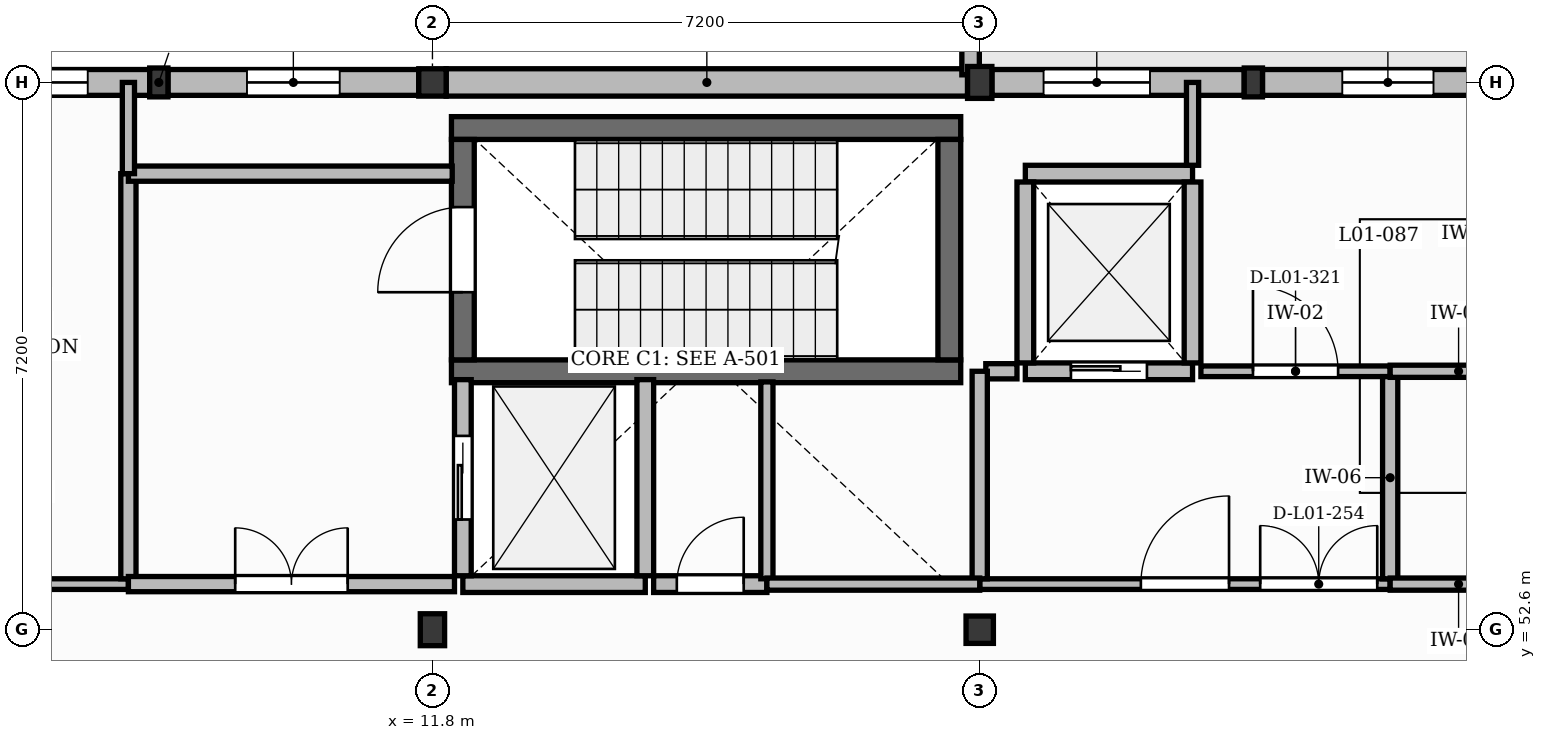
"""IFC4 building model, lengths in metres.
Left out: names, types, materials, properties, quantities, classifications, styles, units other than length and angle.
Written with IfcOpenShell. Run it as: python <this file> out.ifc"""

import sys

from ifc_helpers import new_model, si_unit, direction, frame, frame_2d, origin, origin_2d, place, context, subcontext, project, spatial, rectangle, extrude, element, fill, save


model = new_model("IFC4")
c1 = context("Model", 3, precision=1e-05, world=origin(), true_north=direction((0.0, 1.0)))
c2 = subcontext(c1, "Body", "Model", "MODEL_VIEW")
j1 = project(units=[si_unit("LENGTHUNIT", "METRE"), si_unit("PLANEANGLEUNIT", "RADIAN")], contexts=[c1])
p1 = place(None, origin())
s1 = spatial("IfcSite", under=j1, at=p1, CompositionType="ELEMENT")
p2 = place(p1, origin())
s2 = spatial("IfcBuilding", under=s1, at=p2, CompositionType="ELEMENT")
p3 = place(p2, frame((0.0, 0.0, 4.5)))
s3 = spatial("IfcBuildingStorey", under=s2, at=p3, CompositionType="ELEMENT", Elevation=4.5)
p4 = place(p3, frame((11.8, 52.6, 0.0), z_axis=(0.0, 0.0, 1.0), x_axis=(1.0, 0.0, 0.0)))
e1 = element("IfcColumn", 1, at=p4, inside=s3, PredefinedType="COLUMN", context=c2, shape_type="SweptSolid", body=[
    extrude(rectangle(XDim=0.32, YDim=0.42, at=origin_2d()), origin(), (0.0, 0.0, 1.0), 4.26),
])
for number, where, z_axis, x_axis in (
    (2, (11.8, 59.8, 0.0), (0.0, 0.0, 1.0), (1.0, 0.0, 0.0)),
    (3, (19.0, 52.6, 0.0), (0.0, 0.0, 1.0), (1.0, 0.0, 0.0)),
):
    element("IfcColumn", number, at=place(p3, frame(where, z_axis=z_axis, x_axis=x_axis)), inside=s3, PredefinedType="COLUMN", context=c2, shape_type="SweptSolid", body=[
        extrude(rectangle(XDim=0.36, YDim=0.36, at=origin_2d()), origin(), (0.0, 0.0, 1.0), 4.26),
    ])
p5 = place(p3, frame((19.0, 59.8, 0.0), z_axis=(0.0, 0.0, 1.0), x_axis=(1.0, 0.0, 0.0)))
e4 = element("IfcColumn", 4, at=p5, inside=s3, PredefinedType="COLUMN", context=c2, shape_type="SweptSolid", body=[
    extrude(rectangle(XDim=0.32, YDim=0.42, at=origin_2d()), origin(), (0.0, 0.0, 1.0), 4.26),
])
for number, where, z_axis, x_axis in (
    (5, (8.2, 59.8, 0.0), (0.0, 0.0, 1.0), (1.0, 0.0, 0.0)),
    (6, (22.6, 59.8, 0.0), (0.0, 0.0, 1.0), (1.0, 0.0, 0.0)),
):
    element("IfcColumn", number, at=place(p3, frame(where, z_axis=z_axis, x_axis=x_axis)), inside=s3, PredefinedType="PILASTER", context=c2, shape_type="SweptSolid", body=[
        extrude(rectangle(XDim=0.24, YDim=0.38, at=origin_2d()), origin(), (0.0, 0.0, 1.0), 4.26),
    ])
p6 = place(p3, frame((4.76, 59.8, 0.0), z_axis=(0.0, 0.0, 1.0), x_axis=(1.0, 0.0, 0.0)))
e7 = element("IfcWall", 7, at=p6, inside=s3, PredefinedType="SOLIDWALL", context=c2, shape_type="SweptSolid", body=[
    extrude(rectangle(XDim=3.32, YDim=0.34, at=frame_2d((1.66, 0.0))), origin(), (0.0, 0.0, 1.0), 3.8),
])
p7 = place(p6, frame((0.655, 0.0, 1.0)))
e8 = element("IfcOpeningElement", 8, at=p7, cuts=e7, PredefinedType="OPENING", context=c2, shape_type="SweptSolid", body=[
    extrude(rectangle(XDim=1.85, YDim=2.2, at=frame_2d((0.925, 1.1))), frame((0.0, 0.18, 0.0), z_axis=(0.0, -1.0, 0.0), x_axis=(1.0, 0.0, 0.0)), (0.0, 0.0, 1.0), 0.36),
])
p8 = place(p3, frame((8.32, 59.8, 0.0), z_axis=(0.0, 0.0, 1.0), x_axis=(1.0, 0.0, 0.0)))
e9 = element("IfcWall", 9, at=p8, inside=s3, PredefinedType="SOLIDWALL", context=c2, shape_type="SweptSolid", body=[
    extrude(rectangle(XDim=3.3, YDim=0.34, at=frame_2d((1.65, 0.0))), origin(), (0.0, 0.0, 1.0), 3.8),
])
p9 = place(p8, frame((1.04, 0.0, 1.0)))
e10 = element("IfcOpeningElement", 10, at=p9, cuts=e9, PredefinedType="OPENING", context=c2, shape_type="SweptSolid", body=[
    extrude(rectangle(XDim=1.22, YDim=2.2, at=frame_2d((0.61, 1.1))), frame((0.0, 0.18, 0.0), z_axis=(0.0, -1.0, 0.0), x_axis=(1.0, 0.0, 0.0)), (0.0, 0.0, 1.0), 0.36),
])
p10 = place(p3, frame((11.98, 59.8, 0.0), z_axis=(0.0, 0.0, 1.0), x_axis=(1.0, 0.0, 0.0)))
e11 = element("IfcWall", 11, at=p10, inside=s3, PredefinedType="SOLIDWALL", context=c2, shape_type="SweptSolid", body=[
    extrude(rectangle(XDim=6.86, YDim=0.36, at=frame_2d((3.43, 0.0))), origin(), (0.0, 0.0, 1.0), 3.8),
])
p11 = place(p3, frame((19.16, 59.8, 0.0), z_axis=(0.0, 0.0, 1.0), x_axis=(1.0, 0.0, 0.0)))
e12 = element("IfcWall", 12, at=p11, inside=s3, PredefinedType="SOLIDWALL", context=c2, shape_type="SweptSolid", body=[
    extrude(rectangle(XDim=3.32, YDim=0.34, at=frame_2d((1.66, 0.0))), origin(), (0.0, 0.0, 1.0), 3.8),
])
p12 = place(p11, frame((0.68, 0.0, 1.05)))
e13 = element("IfcOpeningElement", 13, at=p12, cuts=e12, PredefinedType="OPENING", context=c2, shape_type="SweptSolid", body=[
    extrude(rectangle(XDim=1.4, YDim=1.65, at=frame_2d((0.7, 0.825))), frame((0.0, 0.18, 0.0), z_axis=(0.0, -1.0, 0.0), x_axis=(1.0, 0.0, 0.0)), (0.0, 0.0, 1.0), 0.36),
])
p13 = place(p3, frame((22.72, 59.8, 0.0), z_axis=(0.0, 0.0, 1.0), x_axis=(1.0, 0.0, 0.0)))
e14 = element("IfcWall", 14, at=p13, inside=s3, PredefinedType="SOLIDWALL", context=c2, shape_type="SweptSolid", body=[
    extrude(rectangle(XDim=3.3, YDim=0.34, at=frame_2d((1.65, 0.0))), origin(), (0.0, 0.0, 1.0), 3.8),
])
p14 = place(p13, frame((1.05, 0.0, 1.0)))
e15 = element("IfcOpeningElement", 15, at=p14, cuts=e14, PredefinedType="OPENING", context=c2, shape_type="SweptSolid", body=[
    extrude(rectangle(XDim=1.2, YDim=1.95, at=frame_2d((0.6, 0.975))), frame((0.0, 0.18, 0.0), z_axis=(0.0, -1.0, 0.0), x_axis=(1.0, 0.0, 0.0)), (0.0, 0.0, 1.0), 0.36),
])
p15 = place(p3, frame((18.88, 59.9, -0.05), z_axis=(0.0, 0.0, 1.0), x_axis=(0.0, 1.0, 0.0)))
e16 = element("IfcWall", 16, at=p15, inside=s3, PredefinedType="PARAPET", context=c2, shape_type="SweptSolid", body=[
    extrude(rectangle(XDim=1.68, YDim=0.23, at=frame_2d((0.84, 0.0))), origin(), (0.0, 0.0, 1.0), 0.8),
])
for number, where, z_axis, x_axis in (
    (17, (12.05, 56.0, 0.0), (0.0, 0.0, 1.0), (1.0, 0.0, 0.0)),
    (18, (12.05, 59.2, 0.0), (0.0, 0.0, 1.0), (1.0, 0.0, 0.0)),
):
    element("IfcWall", number, at=place(p3, frame(where, z_axis=z_axis, x_axis=x_axis)), inside=s3, PredefinedType="SHEAR", context=c2, shape_type="SweptSolid", body=[
        extrude(rectangle(XDim=6.7, YDim=0.3, at=frame_2d((3.35, 0.0))), origin(), (0.0, 0.0, 1.0), 4.25),
    ])
p16 = place(p3, frame((12.2, 56.15, 0.0), z_axis=(0.0, 0.0, 1.0), x_axis=(0.0, 1.0, 0.0)))
e19 = element("IfcWall", 19, at=p16, inside=s3, PredefinedType="SHEAR", context=c2, shape_type="SweptSolid", body=[
    extrude(rectangle(XDim=2.9, YDim=0.3, at=frame_2d((1.45, 0.0))), origin(), (0.0, 0.0, 1.0), 4.25),
])
p17 = place(p16, frame((0.89, 0.0, 0.0)))
e20 = element("IfcOpeningElement", 20, at=p17, cuts=e19, PredefinedType="OPENING", context=c2, shape_type="SweptSolid", body=[
    extrude(rectangle(XDim=1.12, YDim=2.1, at=frame_2d((0.56, 1.05))), frame((0.0, 0.16, 0.0), z_axis=(0.0, -1.0, 0.0), x_axis=(1.0, 0.0, 0.0)), (0.0, 0.0, 1.0), 0.32),
])
p18 = place(p3, frame((18.6, 56.15, 0.0), z_axis=(0.0, 0.0, 1.0), x_axis=(0.0, 1.0, 0.0)))
e21 = element("IfcWall", 21, at=p18, inside=s3, PredefinedType="SHEAR", context=c2, shape_type="SweptSolid", body=[
    extrude(rectangle(XDim=2.9, YDim=0.3, at=frame_2d((1.45, 0.0))), origin(), (0.0, 0.0, 1.0), 4.25),
])
p19 = place(p3, frame((12.2, 53.2, 0.0), z_axis=(0.0, 0.0, 1.0), x_axis=(1.0, 0.0, 0.0)))
e22 = element("IfcWall", 22, at=p19, inside=s3, PredefinedType="SOLIDWALL", context=c2, shape_type="SweptSolid", body=[
    extrude(rectangle(XDim=2.4, YDim=0.22, at=frame_2d((1.2, 0.0))), origin(), (0.0, 0.0, 1.0), 4.25),
])
p20 = place(p3, frame((12.2, 53.31, 0.0), z_axis=(0.0, 0.0, 1.0), x_axis=(0.0, 1.0, 0.0)))
e23 = element("IfcWall", 23, at=p20, inside=s3, PredefinedType="SOLIDWALL", context=c2, shape_type="SweptSolid", body=[
    extrude(rectangle(XDim=2.58, YDim=0.22, at=frame_2d((1.29, 0.0))), origin(), (0.0, 0.0, 1.0), 4.25),
])
p21 = place(p20, frame((0.74, 0.0, 0.0)))
e24 = element("IfcOpeningElement", 24, at=p21, cuts=e23, PredefinedType="OPENING", context=c2, shape_type="SweptSolid", body=[
    extrude(rectangle(XDim=1.1, YDim=2.15, at=frame_2d((0.55, 1.075))), frame((0.0, 0.12, 0.0), z_axis=(0.0, -1.0, 0.0), x_axis=(1.0, 0.0, 0.0)), (0.0, 0.0, 1.0), 0.24),
])
p22 = place(p3, frame((14.6, 53.31, 0.0), z_axis=(0.0, 0.0, 1.0), x_axis=(0.0, 1.0, 0.0)))
e25 = element("IfcWall", 25, at=p22, inside=s3, PredefinedType="SOLIDWALL", context=c2, shape_type="SweptSolid", body=[
    extrude(rectangle(XDim=2.58, YDim=0.22, at=frame_2d((1.29, 0.0))), origin(), (0.0, 0.0, 1.0), 4.25),
])
p23 = place(p3, frame((19.6, 56.0, 0.0), z_axis=(0.0, 0.0, 1.0), x_axis=(1.0, 0.0, 0.0)))
e26 = element("IfcWall", 26, at=p23, inside=s3, PredefinedType="SOLIDWALL", context=c2, shape_type="SweptSolid", body=[
    extrude(rectangle(XDim=2.2, YDim=0.22, at=frame_2d((1.1, 0.0))), origin(), (0.0, 0.0, 1.0), 4.25),
])
p24 = place(p23, frame((0.6, 0.0, 0.0)))
e27 = element("IfcOpeningElement", 27, at=p24, cuts=e26, PredefinedType="OPENING", context=c2, shape_type="SweptSolid", body=[
    extrude(rectangle(XDim=1.0, YDim=2.15, at=frame_2d((0.5, 1.075))), frame((0.0, 0.12, 0.0), z_axis=(0.0, -1.0, 0.0), x_axis=(1.0, 0.0, 0.0)), (0.0, 0.0, 1.0), 0.24),
])
p25 = place(p3, frame((19.6, 58.6, 0.0), z_axis=(0.0, 0.0, 1.0), x_axis=(1.0, 0.0, 0.0)))
e28 = element("IfcWall", 28, at=p25, inside=s3, PredefinedType="SOLIDWALL", context=c2, shape_type="SweptSolid", body=[
    extrude(rectangle(XDim=2.2, YDim=0.22, at=frame_2d((1.1, 0.0))), origin(), (0.0, 0.0, 1.0), 4.25),
])
for number, where, z_axis, x_axis in (
    (29, (19.6, 56.11, 0.0), (0.0, 0.0, 1.0), (0.0, 1.0, 0.0)),
    (30, (21.8, 56.11, 0.0), (0.0, 0.0, 1.0), (0.0, 1.0, 0.0)),
):
    element("IfcWall", number, at=place(p3, frame(where, z_axis=z_axis, x_axis=x_axis)), inside=s3, PredefinedType="SOLIDWALL", context=c2, shape_type="SweptSolid", body=[
        extrude(rectangle(XDim=2.38, YDim=0.22, at=frame_2d((1.19, 0.0))), origin(), (0.0, 0.0, 1.0), 4.25),
    ])
p26 = place(p3, frame((4.6, 53.2, 0.0), z_axis=(0.0, 0.0, 1.0), x_axis=(1.0, 0.0, 0.0)))
e31 = element("IfcWall", 31, at=p26, inside=s3, PredefinedType="PARTITIONING", context=c2, shape_type="SweptSolid", body=[
    extrude(rectangle(XDim=3.2, YDim=0.14, at=frame_2d((1.6, 0.0))), origin(), (0.0, 0.0, 1.0), 4.18),
])
p27 = place(p26, frame((1.08, 0.0, 0.0)))
e32 = element("IfcOpeningElement", 32, at=p27, cuts=e31, PredefinedType="OPENING", context=c2, shape_type="SweptSolid", body=[
    extrude(rectangle(XDim=1.04, YDim=2.1, at=frame_2d((0.52, 1.05))), frame((0.0, 0.08, 0.0), z_axis=(0.0, -1.0, 0.0), x_axis=(1.0, 0.0, 0.0)), (0.0, 0.0, 1.0), 0.16),
])
p28 = place(p3, frame((7.8, 53.27, 0.0), z_axis=(0.0, 0.0, 1.0), x_axis=(0.0, 1.0, 0.0)))
e33 = element("IfcWall", 33, at=p28, inside=s3, PredefinedType="PARTITIONING", context=c2, shape_type="SweptSolid", body=[
    extrude(rectangle(XDim=5.33, YDim=0.2, at=frame_2d((2.665, 0.0))), origin(), (0.0, 0.0, 1.0), 4.18),
])
p29 = place(p3, frame((7.8, 53.2, 0.0), z_axis=(0.0, 0.0, 1.0), x_axis=(1.0, 0.0, 0.0)))
e34 = element("IfcWall", 34, at=p29, inside=s3, PredefinedType="PARTITIONING", context=c2, shape_type="SweptSolid", body=[
    extrude(rectangle(XDim=4.29, YDim=0.2, at=frame_2d((2.145, 0.0))), origin(), (0.0, 0.0, 1.0), 4.18),
])
p30 = place(p29, frame((1.405, 0.0, 0.0)))
e35 = element("IfcOpeningElement", 35, at=p30, cuts=e34, PredefinedType="OPENING", context=c2, shape_type="SweptSolid", body=[
    extrude(rectangle(XDim=1.48, YDim=2.25, at=frame_2d((0.74, 1.125))), frame((0.0, 0.11, 0.0), z_axis=(0.0, -1.0, 0.0), x_axis=(1.0, 0.0, 0.0)), (0.0, 0.0, 1.0), 0.22),
])
p31 = place(p3, frame((14.71, 53.2, 0.0), z_axis=(0.0, 0.0, 1.0), x_axis=(1.0, 0.0, 0.0)))
e36 = element("IfcWall", 36, at=p31, inside=s3, PredefinedType="SOLIDWALL", context=c2, shape_type="SweptSolid", body=[
    extrude(rectangle(XDim=1.49, YDim=0.22, at=frame_2d((0.745, 0.0))), origin(), (0.0, 0.0, 1.0), 4.18),
])
p32 = place(p31, frame((0.305, 0.0, 0.0)))
e37 = element("IfcOpeningElement", 37, at=p32, cuts=e36, PredefinedType="OPENING", context=c2, shape_type="SweptSolid", body=[
    extrude(rectangle(XDim=0.88, YDim=2.05, at=frame_2d((0.44, 1.025))), frame((0.0, 0.12, 0.0), z_axis=(0.0, -1.0, 0.0), x_axis=(1.0, 0.0, 0.0)), (0.0, 0.0, 1.0), 0.24),
])
p33 = place(p3, frame((19.0, 53.2, 0.0), z_axis=(0.0, 0.0, 1.0), x_axis=(1.0, 0.0, 0.0)))
e38 = element("IfcWall", 38, at=p33, inside=s3, PredefinedType="PARTITIONING", context=c2, shape_type="SweptSolid", body=[
    extrude(rectangle(XDim=5.4, YDim=0.14, at=frame_2d((2.7, 0.0))), origin(), (0.0, 0.0, 1.0), 4.18),
])
p34 = place(p33, frame((2.12, 0.0, 0.0)))
e39 = element("IfcOpeningElement", 39, at=p34, cuts=e38, PredefinedType="OPENING", context=c2, shape_type="SweptSolid", body=[
    extrude(rectangle(XDim=1.16, YDim=2.1, at=frame_2d((0.58, 1.05))), frame((0.0, 0.08, 0.0), z_axis=(0.0, -1.0, 0.0), x_axis=(1.0, 0.0, 0.0)), (0.0, 0.0, 1.0), 0.16),
])
p35 = place(p33, frame((3.69, 0.0, 0.0)))
e40 = element("IfcOpeningElement", 40, at=p35, cuts=e38, PredefinedType="OPENING", context=c2, shape_type="SweptSolid", body=[
    extrude(rectangle(XDim=1.54, YDim=2.25, at=frame_2d((0.77, 1.125))), frame((0.0, 0.08, 0.0), z_axis=(0.0, -1.0, 0.0), x_axis=(1.0, 0.0, 0.0)), (0.0, 0.0, 1.0), 0.16),
])
p36 = place(p3, frame((21.91, 56.0, 0.0), z_axis=(0.0, 0.0, 1.0), x_axis=(1.0, 0.0, 0.0)))
e41 = element("IfcWall", 41, at=p36, inside=s3, PredefinedType="PARTITIONING", context=c2, shape_type="SweptSolid", body=[
    extrude(rectangle(XDim=2.49, YDim=0.14, at=frame_2d((1.245, 0.0))), origin(), (0.0, 0.0, 1.0), 4.18),
])
p37 = place(p36, frame((0.685, 0.0, 0.0)))
e42 = element("IfcOpeningElement", 42, at=p37, cuts=e41, PredefinedType="OPENING", context=c2, shape_type="SweptSolid", body=[
    extrude(rectangle(XDim=1.12, YDim=2.15, at=frame_2d((0.56, 1.075))), frame((0.0, 0.08, 0.0), z_axis=(0.0, -1.0, 0.0), x_axis=(1.0, 0.0, 0.0)), (0.0, 0.0, 1.0), 0.16),
])
p38 = place(p3, frame((16.2, 53.27, 0.0), z_axis=(0.0, 0.0, 1.0), x_axis=(0.0, 1.0, 0.0)))
e43 = element("IfcWall", 43, at=p38, inside=s3, PredefinedType="PARTITIONING", context=c2, shape_type="SweptSolid", body=[
    extrude(rectangle(XDim=2.59, YDim=0.16, at=frame_2d((1.295, 0.0))), origin(), (0.0, 0.0, 1.0), 4.18),
])
p39 = place(p3, frame((12.06, 58.6, 0.0), z_axis=(0.0, 0.0, 1.0), x_axis=(-1.0, 0.0, 0.0)))
e44 = element("IfcWall", 44, at=p39, inside=s3, PredefinedType="PARTITIONING", context=c2, shape_type="SweptSolid", body=[
    extrude(rectangle(XDim=4.26, YDim=0.2, at=frame_2d((2.13, 0.0))), origin(), (0.0, 0.0, 1.0), 4.18),
])
p40 = place(p3, frame((24.4, 53.27, 0.0), z_axis=(0.0, 0.0, 1.0), x_axis=(0.0, 1.0, 0.0)))
e45 = element("IfcWall", 45, at=p40, inside=s3, PredefinedType="PARTITIONING", context=c2, shape_type="SweptSolid", body=[
    extrude(rectangle(XDim=2.66, YDim=0.2, at=frame_2d((1.33, 0.0))), origin(), (0.0, 0.0, 1.0), 4.18),
])
p41 = place(p3, frame((19.49, 56.0, 0.0), z_axis=(0.0, 0.0, 1.0), x_axis=(-1.0, 0.0, 0.0)))
e46 = element("IfcWall", 46, at=p41, inside=s3, PredefinedType="PARTITIONING", context=c2, shape_type="SweptSolid", body=[
    extrude(rectangle(XDim=0.41, YDim=0.2, at=frame_2d((0.205, 0.0))), origin(), (0.0, 0.0, 1.0), 4.18),
])
p42 = place(p3, frame((19.0, 53.27, 0.0), z_axis=(0.0, 0.0, 1.0), x_axis=(0.0, 1.0, 0.0)))
e47 = element("IfcWall", 47, at=p42, inside=s3, PredefinedType="PARTITIONING", context=c2, shape_type="SweptSolid", body=[
    extrude(rectangle(XDim=2.73, YDim=0.2, at=frame_2d((1.365, 0.0))), origin(), (0.0, 0.0, 1.0), 3.74),
])
p43 = place(p3, frame((26.2, 53.2, 0.0), z_axis=(0.0, 0.0, 1.0), x_axis=(-1.0, 0.0, 0.0)))
e48 = element("IfcWall", 48, at=p43, inside=s3, PredefinedType="PARTITIONING", context=c2, shape_type="SweptSolid", body=[
    extrude(rectangle(XDim=1.8, YDim=0.16, at=frame_2d((0.9, 0.0))), origin(), (0.0, 0.0, 1.0), 4.18),
])
p44 = place(p3, frame((19.0, 53.2, 0.0), z_axis=(0.0, 0.0, 1.0), x_axis=(-1.0, 0.0, 0.0)))
e49 = element("IfcWall", 49, at=p44, inside=s3, PredefinedType="PARTITIONING", context=c2, shape_type="SweptSolid", body=[
    extrude(rectangle(XDim=2.8, YDim=0.16, at=frame_2d((1.4, 0.0))), origin(), (0.0, 0.0, 1.0), 4.18),
])
p45 = place(p3, frame((7.8, 58.6, 0.0), z_axis=(0.0, 0.0, 1.0), x_axis=(0.0, 1.0, 0.0)))
e50 = element("IfcWall", 50, at=p45, inside=s3, PredefinedType="PARTITIONING", context=c2, shape_type="SweptSolid", body=[
    extrude(rectangle(XDim=1.2, YDim=0.16, at=frame_2d((0.6, 0.0))), origin(), (0.0, 0.0, 1.0), 4.18),
])
p46 = place(p3, frame((24.4, 56.0, 0.0), z_axis=(0.0, 0.0, 1.0), x_axis=(1.0, 0.0, 0.0)))
e51 = element("IfcWall", 51, at=p46, inside=s3, PredefinedType="PARTITIONING", context=c2, shape_type="SweptSolid", body=[
    extrude(rectangle(XDim=1.8, YDim=0.16, at=frame_2d((0.9, 0.0))), origin(), (0.0, 0.0, 1.0), 4.18),
])
p47 = place(p3, frame((21.8, 58.71, 0.0), z_axis=(0.0, 0.0, 1.0), x_axis=(0.0, 1.0, 0.0)))
e52 = element("IfcWall", 52, at=p47, inside=s3, PredefinedType="PARTITIONING", context=c2, shape_type="SweptSolid", body=[
    extrude(rectangle(XDim=1.09, YDim=0.16, at=frame_2d((0.545, 0.0))), origin(), (0.0, 0.0, 1.0), 4.18),
])
p48 = place(p7, origin())
e53 = element("IfcWindow", 53, at=p48, inside=s3, PartitioningType="DOUBLE_PANEL_VERTICAL", PredefinedType="WINDOW", context=c2, shape_type="SweptSolid", body=[
    extrude(rectangle(XDim=1.85, YDim=2.2, at=frame_2d((0.925, 1.1))), frame((0.0, 0.03, 0.0), z_axis=(0.0, -1.0, 0.0), x_axis=(1.0, 0.0, 0.0)), (0.0, 0.0, 1.0), 0.06),
])
fill(e8, e53)
p49 = place(p9, origin())
e54 = element("IfcWindow", 54, at=p49, inside=s3, PartitioningType="SINGLE_PANEL", PredefinedType="WINDOW", context=c2, shape_type="SweptSolid", body=[
    extrude(rectangle(XDim=1.22, YDim=2.2, at=frame_2d((0.61, 1.1))), frame((0.0, 0.03, 0.0), z_axis=(0.0, -1.0, 0.0), x_axis=(1.0, 0.0, 0.0)), (0.0, 0.0, 1.0), 0.06),
])
fill(e10, e54)
p50 = place(p12, origin())
e55 = element("IfcWindow", 55, at=p50, inside=s3, PartitioningType="SINGLE_PANEL", PredefinedType="WINDOW", context=c2, shape_type="SweptSolid", body=[
    extrude(rectangle(XDim=1.4, YDim=1.65, at=frame_2d((0.7, 0.825))), frame((0.0, 0.03, 0.0), z_axis=(0.0, -1.0, 0.0), x_axis=(1.0, 0.0, 0.0)), (0.0, 0.0, 1.0), 0.06),
])
fill(e13, e55)
p51 = place(p14, origin())
e56 = element("IfcWindow", 56, at=p51, inside=s3, PartitioningType="SINGLE_PANEL", PredefinedType="WINDOW", context=c2, shape_type="SweptSolid", body=[
    extrude(rectangle(XDim=1.2, YDim=1.95, at=frame_2d((0.6, 0.975))), frame((0.0, 0.03, 0.0), z_axis=(0.0, -1.0, 0.0), x_axis=(1.0, 0.0, 0.0)), (0.0, 0.0, 1.0), 0.06),
])
fill(e15, e56)
p52 = place(p21, origin())
e57 = element("IfcDoor", 57, at=p52, inside=s3, OperationType="SLIDING_TO_LEFT", PredefinedType="DOOR", context=c2, shape_type="SweptSolid", body=[
    extrude(rectangle(XDim=1.1, YDim=2.15, at=frame_2d((0.55, 1.075))), frame((0.0, 0.025, 0.0), z_axis=(0.0, -1.0, 0.0), x_axis=(1.0, 0.0, 0.0)), (0.0, 0.0, 1.0), 0.05),
])
fill(e24, e57)
p53 = place(p24, origin())
e58 = element("IfcDoor", 58, at=p53, inside=s3, OperationType="SLIDING_TO_LEFT", PredefinedType="DOOR", context=c2, shape_type="SweptSolid", body=[
    extrude(rectangle(XDim=1.0, YDim=2.15, at=frame_2d((0.5, 1.075))), frame((0.0, 0.025, 0.0), z_axis=(0.0, -1.0, 0.0), x_axis=(1.0, 0.0, 0.0)), (0.0, 0.0, 1.0), 0.05),
])
fill(e27, e58)
p54 = place(p17, origin())
e59 = element("IfcDoor", 59, at=p54, inside=s3, OperationType="SINGLE_SWING_LEFT", PredefinedType="DOOR", context=c2, shape_type="SweptSolid", body=[
    extrude(rectangle(XDim=1.12, YDim=2.1, at=frame_2d((0.56, 1.05))), frame((0.0, 0.025, 0.0), z_axis=(0.0, -1.0, 0.0), x_axis=(1.0, 0.0, 0.0)), (0.0, 0.0, 1.0), 0.05),
])
fill(e20, e59)
p55 = place(p30, origin())
e60 = element("IfcDoor", 60, at=p55, inside=s3, OperationType="DOUBLE_DOOR_SINGLE_SWING", PredefinedType="DOOR", context=c2, shape_type="SweptSolid", body=[
    extrude(rectangle(XDim=1.48, YDim=2.25, at=frame_2d((0.74, 1.125))), frame((0.0, 0.025, 0.0), z_axis=(0.0, -1.0, 0.0), x_axis=(1.0, 0.0, 0.0)), (0.0, 0.0, 1.0), 0.05),
])
fill(e35, e60)
p56 = place(p34, origin())
e61 = element("IfcDoor", 61, at=p56, inside=s3, OperationType="SINGLE_SWING_RIGHT", PredefinedType="DOOR", context=c2, shape_type="SweptSolid", body=[
    extrude(rectangle(XDim=1.16, YDim=2.1, at=frame_2d((0.58, 1.05))), frame((0.0, 0.025, 0.0), z_axis=(0.0, -1.0, 0.0), x_axis=(1.0, 0.0, 0.0)), (0.0, 0.0, 1.0), 0.05),
])
fill(e39, e61)
p57 = place(p35, origin())
e62 = element("IfcDoor", 62, at=p57, inside=s3, OperationType="DOUBLE_DOOR_SINGLE_SWING", PredefinedType="DOOR", context=c2, shape_type="SweptSolid", body=[
    extrude(rectangle(XDim=1.54, YDim=2.25, at=frame_2d((0.77, 1.125))), frame((0.0, 0.025, 0.0), z_axis=(0.0, -1.0, 0.0), x_axis=(1.0, 0.0, 0.0)), (0.0, 0.0, 1.0), 0.05),
])
fill(e40, e62)
p58 = place(p32, origin())
e63 = element("IfcDoor", 63, at=p58, inside=s3, OperationType="SINGLE_SWING_RIGHT", PredefinedType="DOOR", context=c2, shape_type="SweptSolid", body=[
    extrude(rectangle(XDim=0.88, YDim=2.05, at=frame_2d((0.44, 1.025))), frame((0.0, 0.025, 0.0), z_axis=(0.0, -1.0, 0.0), x_axis=(1.0, 0.0, 0.0)), (0.0, 0.0, 1.0), 0.05),
])
fill(e37, e63)
p59 = place(p37, origin())
e64 = element("IfcDoor", 64, at=p59, inside=s3, OperationType="SINGLE_SWING_LEFT", PredefinedType="DOOR", context=c2, shape_type="SweptSolid", body=[
    extrude(rectangle(XDim=1.12, YDim=2.15, at=frame_2d((0.56, 1.075))), frame((0.0, 0.025, 0.0), z_axis=(0.0, -1.0, 0.0), x_axis=(1.0, 0.0, 0.0)), (0.0, 0.0, 1.0), 0.05),
])
fill(e42, e64)
save(model, sys.argv[1])
